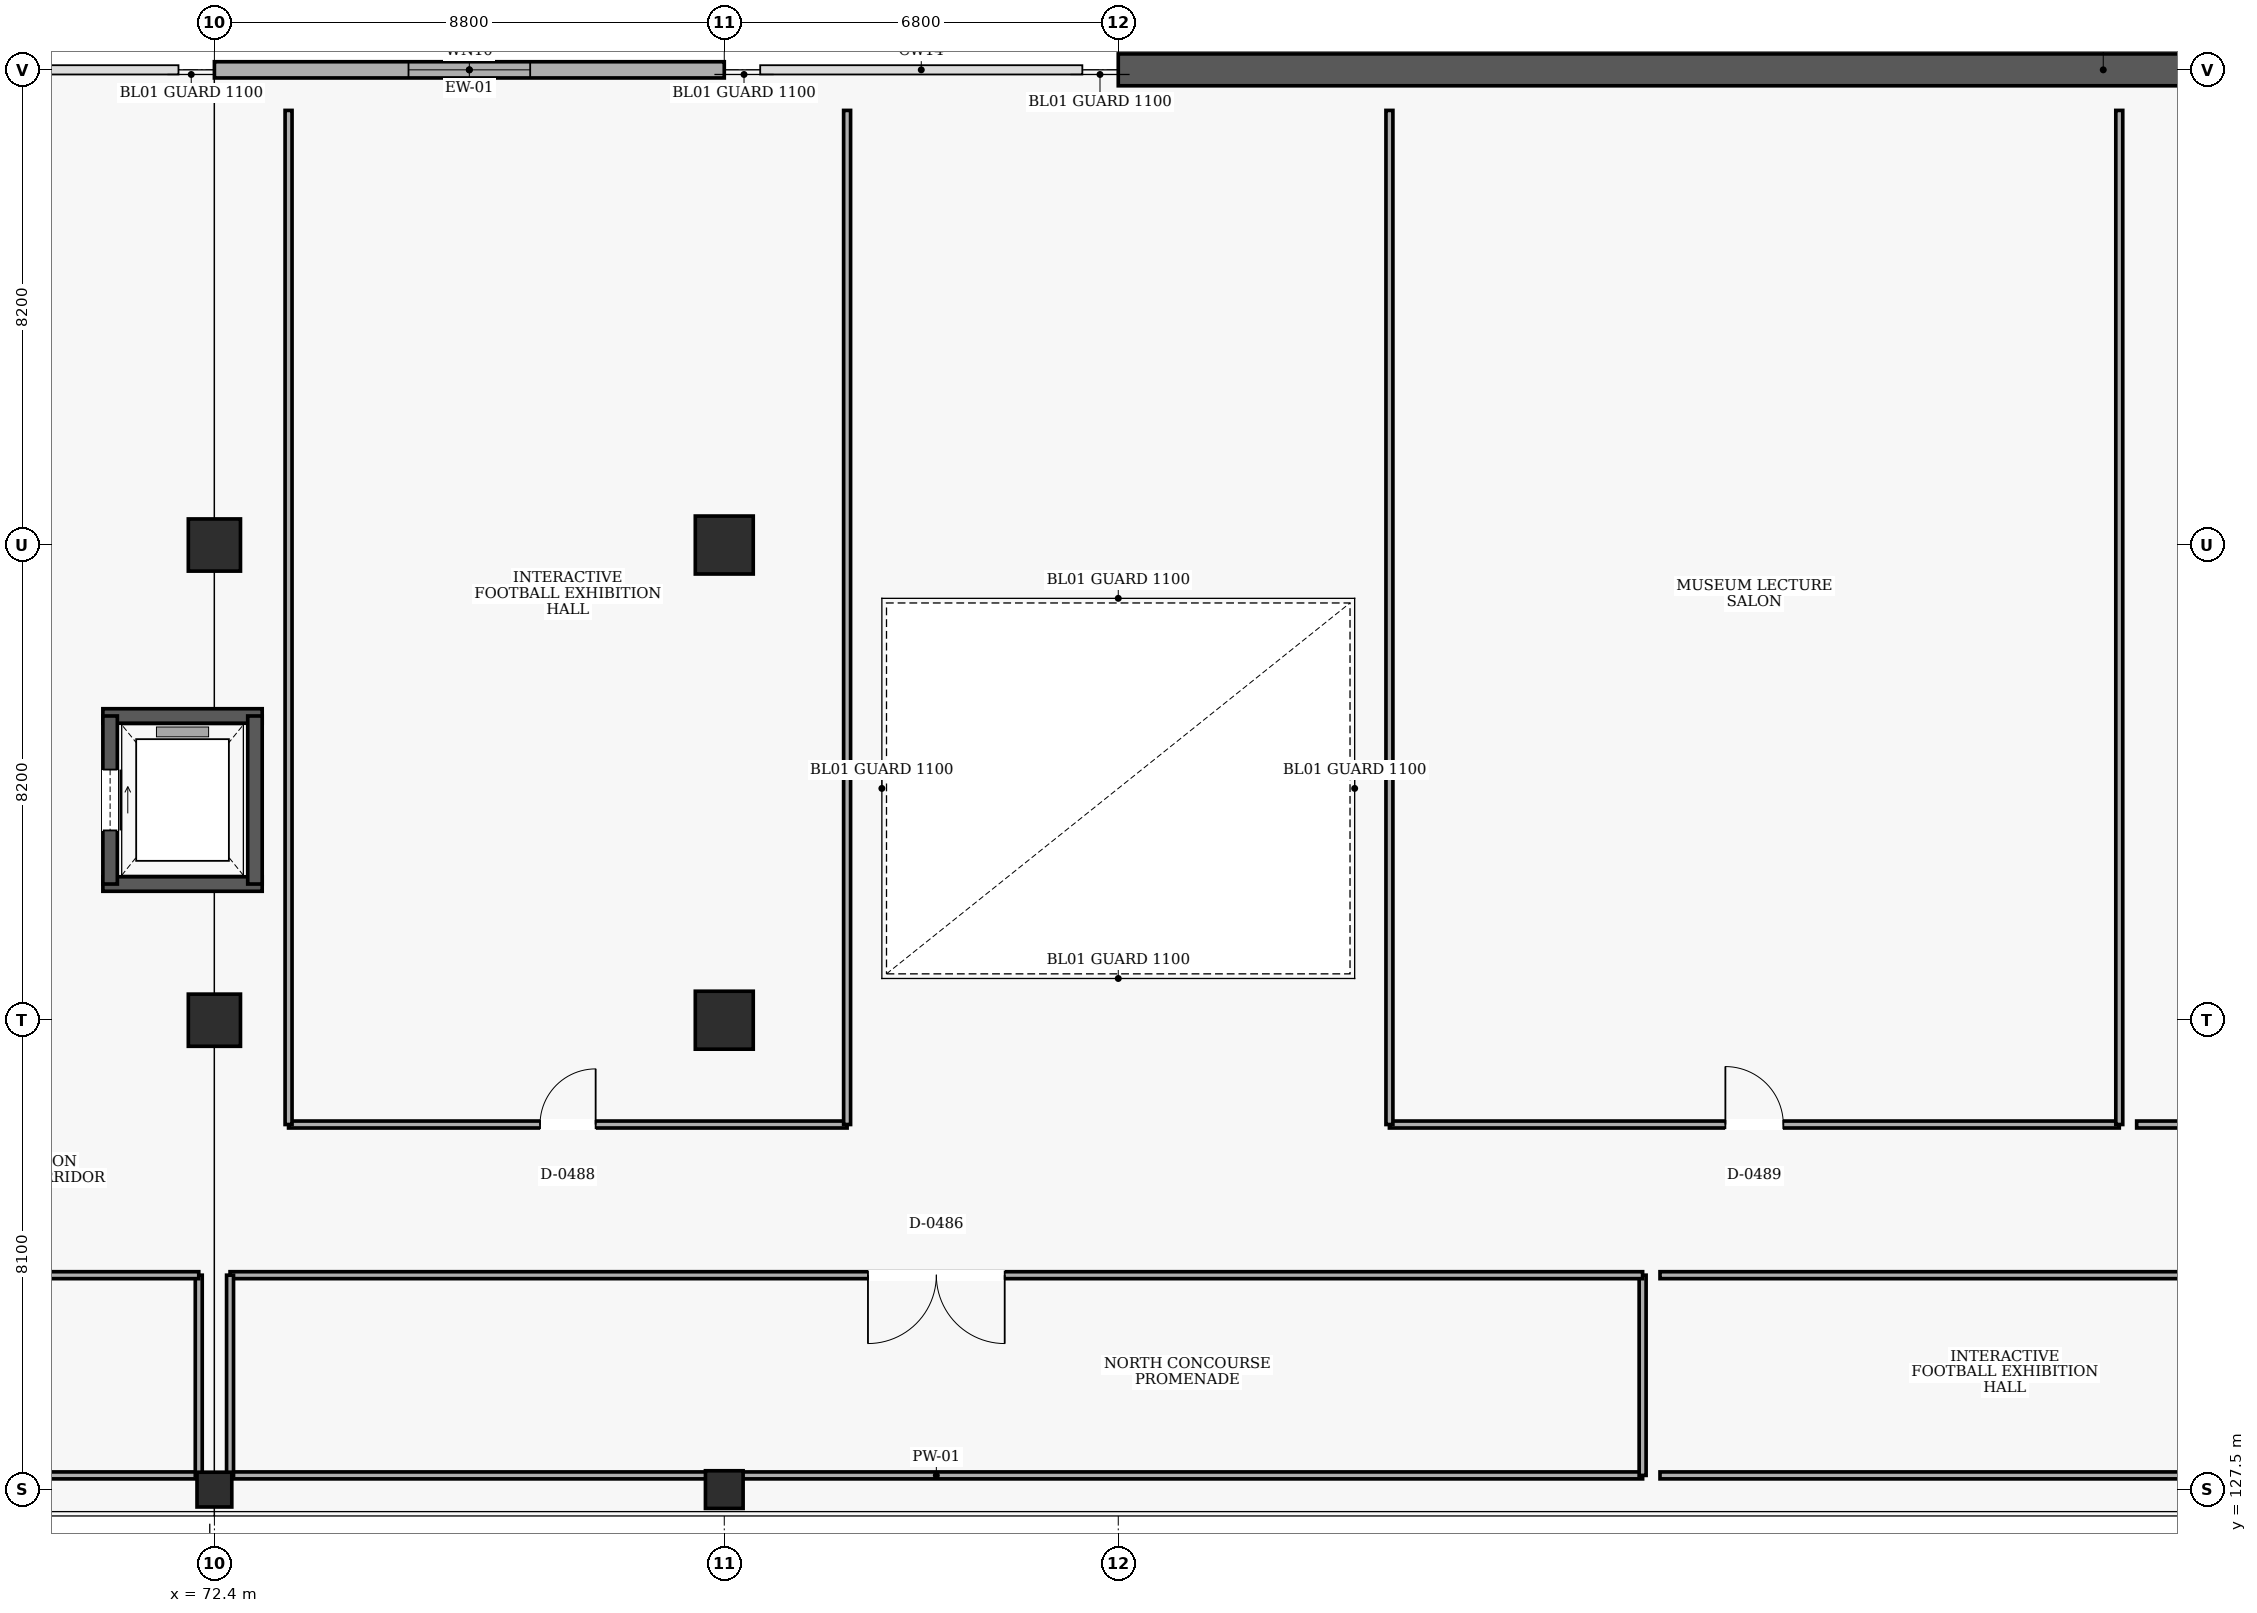
"""IFC4 building model, lengths in metres.
Left out: names, types, materials, properties, quantities, classifications, styles, units other than length and angle.
Written with IfcOpenShell. Run it as: python <this file> out.ifc"""

import sys

from ifc_helpers import new_model, si_unit, direction, frame, frame_2d, origin, origin_2d, place, context, subcontext, project, spatial, rectangle, extrude, element, fill, save


model = new_model("IFC4")
c1 = context("Model", 3, precision=1e-05, world=origin(), true_north=direction((0.0, 1.0)))
c2 = subcontext(c1, "Body", "Model", "MODEL_VIEW")
j1 = project(units=[si_unit("LENGTHUNIT", "METRE"), si_unit("PLANEANGLEUNIT", "RADIAN")], contexts=[c1])
p1 = place(None, origin())
s1 = spatial("IfcSite", under=j1, at=p1, CompositionType="ELEMENT")
p2 = place(p1, origin())
s2 = spatial("IfcBuilding", under=s1, at=p2, CompositionType="ELEMENT")
p3 = place(p2, frame((0.0, 0.0, 5.4)))
s3 = spatial("IfcBuildingStorey", under=s2, at=p3, CompositionType="ELEMENT", Elevation=5.4)
p4 = place(p3, frame((72.4, 127.5, 0.0), z_axis=(0.0, 0.0, 1.0), x_axis=(1.0, 0.0, 0.0)))
e1 = element("IfcColumn", 1, at=p4, inside=s3, PredefinedType="COLUMN", context=c2, shape_type="SweptSolid", body=[
    extrude(rectangle(XDim=0.6, YDim=0.6, at=origin_2d()), origin(), (0.0, 0.0, 1.0), 4.8),
])
for number, where, z_axis, x_axis in (
    (2, (72.4, 135.6, 0.0), (0.0, 0.0, 1.0), (1.0, 0.0, 0.0)),
    (3, (72.4, 143.8, 0.0), (0.0, 0.0, 1.0), (1.0, 0.0, 0.0)),
):
    element("IfcColumn", number, at=place(p3, frame(where, z_axis=z_axis, x_axis=x_axis)), inside=s3, PredefinedType="COLUMN", context=c2, shape_type="SweptSolid", body=[
        extrude(rectangle(XDim=0.9, YDim=0.9, at=origin_2d()), origin(), (0.0, 0.0, 1.0), 4.8),
    ])
p5 = place(p3, frame((81.2, 127.5, 0.0), z_axis=(0.0, 0.0, 1.0), x_axis=(1.0, 0.0, 0.0)))
e4 = element("IfcColumn", 4, at=p5, inside=s3, PredefinedType="COLUMN", context=c2, shape_type="SweptSolid", body=[
    extrude(rectangle(XDim=0.65, YDim=0.65, at=origin_2d()), origin(), (0.0, 0.0, 1.0), 4.8),
])
for number, where, z_axis, x_axis in (
    (5, (81.2, 135.6, 0.0), (0.0, 0.0, 1.0), (1.0, 0.0, 0.0)),
    (6, (81.2, 143.8, 0.0), (0.0, 0.0, 1.0), (1.0, 0.0, 0.0)),
):
    element("IfcColumn", number, at=place(p3, frame(where, z_axis=z_axis, x_axis=x_axis)), inside=s3, PredefinedType="COLUMN", context=c2, shape_type="SweptSolid", body=[
        extrude(rectangle(XDim=1.0, YDim=1.0, at=origin_2d()), origin(), (0.0, 0.0, 1.0), 4.8),
    ])
p6 = place(p3, frame((72.4, 152.0, 0.0), z_axis=(0.0, 0.0, 1.0), x_axis=(1.0, 0.0, 0.0)))
e7 = element("IfcWall", 7, at=p6, inside=s3, PredefinedType="SOLIDWALL", context=c2, shape_type="SweptSolid", body=[
    extrude(rectangle(XDim=8.8, YDim=0.28, at=frame_2d((4.4, 0.0))), origin(), (0.0, 0.0, 1.0), 4.48),
])
p7 = place(p6, frame((3.35, 0.0, 0.9)))
e8 = element("IfcOpeningElement", 8, at=p7, cuts=e7, PredefinedType="OPENING", context=c2, shape_type="SweptSolid", body=[
    extrude(rectangle(XDim=2.1, YDim=1.8, at=frame_2d((1.05, 0.9))), frame((0.0, 0.15, 0.0), z_axis=(0.0, -1.0, 0.0), x_axis=(1.0, 0.0, 0.0)), (0.0, 0.0, 1.0), 0.3),
])
p8 = place(p3, frame((88.0, 152.0, 0.0), z_axis=(0.0, 0.0, 1.0), x_axis=(1.0, 0.0, 0.0)))
e9 = element("IfcWall", 9, at=p8, inside=s3, PredefinedType="SHEAR", context=c2, shape_type="SweptSolid", body=[
    extrude(rectangle(XDim=34.0, YDim=0.55, at=frame_2d((17.0, 0.0))), origin(), (0.0, 0.0, 1.0), 4.48),
])
for number, where, z_axis, x_axis in (
    (10, (70.475, 137.95, 0.0), (0.0, 0.0, 1.0), (1.0, 0.0, 0.0)),
    (11, (73.225, 140.85, 0.0), (0.0, 0.0, 1.0), (-1.0, 0.0, 0.0)),
):
    element("IfcWall", number, at=place(p3, frame(where, z_axis=z_axis, x_axis=x_axis)), inside=s3, PredefinedType="SHEAR", context=c2, shape_type="SweptSolid", body=[
        extrude(rectangle(XDim=2.75, YDim=0.25, at=frame_2d((1.375, 0.0))), origin(), (0.0, 0.0, 1.0), 4.5),
    ])
p9 = place(p3, frame((70.6, 140.85, 0.0), z_axis=(0.0, 0.0, 1.0), x_axis=(0.0, -1.0, 0.0)))
e12 = element("IfcWall", 12, at=p9, inside=s3, PredefinedType="SHEAR", context=c2, shape_type="SweptSolid", body=[
    extrude(rectangle(XDim=2.9, YDim=0.25, at=frame_2d((1.45, 0.0))), origin(), (0.0, 0.0, 1.0), 4.5),
])
p10 = place(p9, frame((0.925, 0.0, 0.0)))
e13 = element("IfcOpeningElement", 13, at=p10, cuts=e12, PredefinedType="OPENING", context=c2, shape_type="SweptSolid", body=[
    extrude(rectangle(XDim=1.05, YDim=2.15, at=frame_2d((0.525, 1.075))), frame((0.0, 0.135, 0.0), z_axis=(0.0, -1.0, 0.0), x_axis=(1.0, 0.0, 0.0)), (0.0, 0.0, 1.0), 0.27),
])
p11 = place(p3, frame((73.1, 137.95, 0.0), z_axis=(0.0, 0.0, 1.0), x_axis=(0.0, 1.0, 0.0)))
e14 = element("IfcWall", 14, at=p11, inside=s3, PredefinedType="SHEAR", context=c2, shape_type="SweptSolid", body=[
    extrude(rectangle(XDim=2.9, YDim=0.25, at=frame_2d((1.45, 0.0))), origin(), (0.0, 0.0, 1.0), 4.5),
])
p12 = place(p3, frame((56.618, 127.745, 0.0), z_axis=(0.0, 0.0, 1.0), x_axis=(1.0, 0.0, 0.0)))
e15 = element("IfcWall", 15, at=p12, inside=s3, PredefinedType="PARTITIONING", context=c2, shape_type="SweptSolid", body=[
    extrude(rectangle(XDim=15.511, YDim=0.12, at=frame_2d((7.756, 0.0))), origin(), (0.0, 0.0, 1.0), 3.63),
])
p13 = place(p3, frame((72.13, 127.745, 0.0), z_axis=(0.0, 0.0, 1.0), x_axis=(0.0, 1.0, 0.0)))
e16 = element("IfcWall", 16, at=p13, inside=s3, PredefinedType="PARTITIONING", context=c2, shape_type="SweptSolid", body=[
    extrude(rectangle(XDim=3.455, YDim=0.12, at=frame_2d((1.728, 0.0))), origin(), (0.0, 0.0, 1.0), 3.78),
])
p14 = place(p3, frame((72.13, 131.2, 0.0), z_axis=(0.0, 0.0, 1.0), x_axis=(-1.0, 0.0, 0.0)))
e17 = element("IfcWall", 17, at=p14, inside=s3, PredefinedType="PARTITIONING", context=c2, shape_type="SweptSolid", body=[
    extrude(rectangle(XDim=15.511, YDim=0.12, at=frame_2d((7.756, 0.0))), origin(), (0.0, 0.0, 1.0), 4.5),
])
p15 = place(p14, frame((6.716, 0.0, 0.0)))
e18 = element("IfcOpeningElement", 18, at=p15, cuts=e17, PredefinedType="OPENING", context=c2, shape_type="SweptSolid", body=[
    extrude(rectangle(XDim=2.08, YDim=2.35, at=frame_2d((1.04, 1.175))), frame((0.0, 0.07, 0.0), z_axis=(0.0, -1.0, 0.0), x_axis=(1.0, 0.0, 0.0)), (0.0, 0.0, 1.0), 0.14),
])
p16 = place(p3, frame((72.67, 127.745, 0.0), z_axis=(0.0, 0.0, 1.0), x_axis=(1.0, 0.0, 0.0)))
e19 = element("IfcWall", 19, at=p16, inside=s3, PredefinedType="PARTITIONING", context=c2, shape_type="SweptSolid", body=[
    extrude(rectangle(XDim=24.38, YDim=0.12, at=frame_2d((12.19, 0.0))), origin(), (0.0, 0.0, 1.0), 3.68),
])
p17 = place(p3, frame((97.05, 127.745, 0.0), z_axis=(0.0, 0.0, 1.0), x_axis=(0.0, 1.0, 0.0)))
e20 = element("IfcWall", 20, at=p17, inside=s3, PredefinedType="PARTITIONING", context=c2, shape_type="SweptSolid", body=[
    extrude(rectangle(XDim=3.455, YDim=0.12, at=frame_2d((1.728, 0.0))), origin(), (0.0, 0.0, 1.0), 4.5),
])
p18 = place(p3, frame((97.05, 131.2, 0.0), z_axis=(0.0, 0.0, 1.0), x_axis=(-1.0, 0.0, 0.0)))
e21 = element("IfcWall", 21, at=p18, inside=s3, PredefinedType="PARTITIONING", context=c2, shape_type="SweptSolid", body=[
    extrude(rectangle(XDim=24.38, YDim=0.12, at=frame_2d((12.19, 0.0))), origin(), (0.0, 0.0, 1.0), 4.5),
])
p19 = place(p18, frame((11.01, 0.0, 0.0)))
e22 = element("IfcOpeningElement", 22, at=p19, cuts=e21, PredefinedType="OPENING", context=c2, shape_type="SweptSolid", body=[
    extrude(rectangle(XDim=2.36, YDim=2.4, at=frame_2d((1.18, 1.2))), frame((0.0, 0.07, 0.0), z_axis=(0.0, -1.0, 0.0), x_axis=(1.0, 0.0, 0.0)), (0.0, 0.0, 1.0), 0.14),
])
p20 = place(p3, frame((72.67, 131.2, 0.0), z_axis=(0.0, 0.0, 1.0), x_axis=(0.0, -1.0, 0.0)))
e23 = element("IfcWall", 23, at=p20, inside=s3, PredefinedType="PARTITIONING", context=c2, shape_type="SweptSolid", body=[
    extrude(rectangle(XDim=3.455, YDim=0.12, at=frame_2d((1.728, 0.0))), origin(), (0.0, 0.0, 1.0), 3.78),
])
p21 = place(p3, frame((97.35, 127.745, 0.0), z_axis=(0.0, 0.0, 1.0), x_axis=(1.0, 0.0, 0.0)))
e24 = element("IfcWall", 24, at=p21, inside=s3, PredefinedType="PARTITIONING", context=c2, shape_type="SweptSolid", body=[
    extrude(rectangle(XDim=24.38, YDim=0.12, at=frame_2d((12.19, 0.0))), origin(), (0.0, 0.0, 1.0), 4.5),
])
p22 = place(p3, frame((121.73, 131.2, 0.0), z_axis=(0.0, 0.0, 1.0), x_axis=(-1.0, 0.0, 0.0)))
e25 = element("IfcWall", 25, at=p22, inside=s3, PredefinedType="PARTITIONING", context=c2, shape_type="SweptSolid", body=[
    extrude(rectangle(XDim=24.38, YDim=0.12, at=frame_2d((12.19, 0.0))), origin(), (0.0, 0.0, 1.0), 4.5),
])
p23 = place(p22, frame((11.73, 0.0, 0.0)))
e26 = element("IfcOpeningElement", 26, at=p23, cuts=e25, PredefinedType="OPENING", context=c2, shape_type="SweptSolid", body=[
    extrude(rectangle(XDim=0.92, YDim=2.1, at=frame_2d((0.46, 1.05))), frame((0.0, 0.07, 0.0), z_axis=(0.0, -1.0, 0.0), x_axis=(1.0, 0.0, 0.0)), (0.0, 0.0, 1.0), 0.14),
])
p24 = place(p3, frame((73.68, 133.8, 0.0), z_axis=(0.0, 0.0, 1.0), x_axis=(1.0, 0.0, 0.0)))
e27 = element("IfcWall", 27, at=p24, inside=s3, PredefinedType="PARTITIONING", context=c2, shape_type="SweptSolid", body=[
    extrude(rectangle(XDim=9.64, YDim=0.12, at=frame_2d((4.82, 0.0))), origin(), (0.0, 0.0, 1.0), 4.5),
])
p25 = place(p24, frame((4.34, 0.0, 0.0)))
e28 = element("IfcOpeningElement", 28, at=p25, cuts=e27, PredefinedType="OPENING", context=c2, shape_type="SweptSolid", body=[
    extrude(rectangle(XDim=0.96, YDim=2.1, at=frame_2d((0.48, 1.05))), frame((0.0, 0.07, 0.0), z_axis=(0.0, -1.0, 0.0), x_axis=(1.0, 0.0, 0.0)), (0.0, 0.0, 1.0), 0.14),
])
for number, where, z_axis, x_axis in (
    (29, (83.32, 133.8, 0.0), (0.0, 0.0, 1.0), (0.0, 1.0, 0.0)),
    (30, (73.68, 151.3, 0.0), (0.0, 0.0, 1.0), (0.0, -1.0, 0.0)),
):
    element("IfcWall", number, at=place(p3, frame(where, z_axis=z_axis, x_axis=x_axis)), inside=s3, PredefinedType="PARTITIONING", context=c2, shape_type="SweptSolid", body=[
        extrude(rectangle(XDim=17.5, YDim=0.12, at=frame_2d((8.75, 0.0))), origin(), (0.0, 0.0, 1.0), 4.5),
    ])
p26 = place(p3, frame((92.68, 133.8, 0.0), z_axis=(0.0, 0.0, 1.0), x_axis=(1.0, 0.0, 0.0)))
e31 = element("IfcWall", 31, at=p26, inside=s3, PredefinedType="PARTITIONING", context=c2, shape_type="SweptSolid", body=[
    extrude(rectangle(XDim=12.597, YDim=0.12, at=frame_2d((6.298, 0.0))), origin(), (0.0, 0.0, 1.0), 4.5),
])
p27 = place(p26, frame((5.798, 0.0, 0.0)))
e32 = element("IfcOpeningElement", 32, at=p27, cuts=e31, PredefinedType="OPENING", context=c2, shape_type="SweptSolid", body=[
    extrude(rectangle(XDim=1.0, YDim=2.1, at=frame_2d((0.5, 1.05))), frame((0.0, 0.07, 0.0), z_axis=(0.0, -1.0, 0.0), x_axis=(1.0, 0.0, 0.0)), (0.0, 0.0, 1.0), 0.14),
])
for number, where, z_axis, x_axis in (
    (33, (105.277, 133.8, 0.0), (0.0, 0.0, 1.0), (0.0, 1.0, 0.0)),
    (34, (92.68, 151.3, 0.0), (0.0, 0.0, 1.0), (0.0, -1.0, 0.0)),
):
    element("IfcWall", number, at=place(p3, frame(where, z_axis=z_axis, x_axis=x_axis)), inside=s3, PredefinedType="PARTITIONING", context=c2, shape_type="SweptSolid", body=[
        extrude(rectangle(XDim=17.5, YDim=0.12, at=frame_2d((8.75, 0.0))), origin(), (0.0, 0.0, 1.0), 4.5),
    ])
p28 = place(p3, frame((105.577, 133.8, 0.0), z_axis=(0.0, 0.0, 1.0), x_axis=(1.0, 0.0, 0.0)))
e35 = element("IfcWall", 35, at=p28, inside=s3, PredefinedType="PARTITIONING", context=c2, shape_type="SweptSolid", body=[
    extrude(rectangle(XDim=16.153, YDim=0.12, at=frame_2d((8.077, 0.0))), origin(), (0.0, 0.0, 1.0), 4.5),
])
p29 = place(p28, frame((7.552, 0.0, 0.0)))
e36 = element("IfcOpeningElement", 36, at=p29, cuts=e35, PredefinedType="OPENING", context=c2, shape_type="SweptSolid", body=[
    extrude(rectangle(XDim=1.05, YDim=2.15, at=frame_2d((0.525, 1.075))), frame((0.0, 0.07, 0.0), z_axis=(0.0, -1.0, 0.0), x_axis=(1.0, 0.0, 0.0)), (0.0, 0.0, 1.0), 0.14),
])
p30 = place(p7, origin())
e37 = element("IfcWindow", 37, at=p30, inside=s3, PartitioningType="SINGLE_PANEL", PredefinedType="WINDOW", context=c2, shape_type="SweptSolid", body=[
    extrude(rectangle(XDim=2.1, YDim=1.8, at=frame_2d((1.05, 0.9))), frame((0.0, 0.03, 0.0), z_axis=(0.0, -1.0, 0.0), x_axis=(1.0, 0.0, 0.0)), (0.0, 0.0, 1.0), 0.06),
])
fill(e8, e37)
p31 = place(p10, origin())
e38 = element("IfcDoor", 38, at=p31, inside=s3, OperationType="SLIDING_TO_RIGHT", PredefinedType="DOOR", context=c2, shape_type="SweptSolid", body=[
    extrude(rectangle(XDim=1.05, YDim=2.15, at=frame_2d((0.525, 1.075))), frame((0.0, 0.025, 0.0), z_axis=(0.0, -1.0, 0.0), x_axis=(1.0, 0.0, 0.0)), (0.0, 0.0, 1.0), 0.05),
])
fill(e13, e38)
p32 = place(p19, origin())
e39 = element("IfcDoor", 39, at=p32, inside=s3, OperationType="DOUBLE_DOOR_SINGLE_SWING", PredefinedType="DOOR", context=c2, shape_type="SweptSolid", body=[
    extrude(rectangle(XDim=2.36, YDim=2.4, at=frame_2d((1.18, 1.2))), frame((0.0, 0.025, 0.0), z_axis=(0.0, -1.0, 0.0), x_axis=(1.0, 0.0, 0.0)), (0.0, 0.0, 1.0), 0.05),
])
fill(e22, e39)
p33 = place(p25, origin())
e40 = element("IfcDoor", 40, at=p33, inside=s3, OperationType="SINGLE_SWING_RIGHT", PredefinedType="DOOR", context=c2, shape_type="SweptSolid", body=[
    extrude(rectangle(XDim=0.96, YDim=2.1, at=frame_2d((0.48, 1.05))), frame((0.0, 0.025, 0.0), z_axis=(0.0, -1.0, 0.0), x_axis=(1.0, 0.0, 0.0)), (0.0, 0.0, 1.0), 0.05),
])
fill(e28, e40)
p34 = place(p27, origin())
e41 = element("IfcDoor", 41, at=p34, inside=s3, OperationType="SINGLE_SWING_LEFT", PredefinedType="DOOR", context=c2, shape_type="SweptSolid", body=[
    extrude(rectangle(XDim=1.0, YDim=2.1, at=frame_2d((0.5, 1.05))), frame((0.0, 0.025, 0.0), z_axis=(0.0, -1.0, 0.0), x_axis=(1.0, 0.0, 0.0)), (0.0, 0.0, 1.0), 0.05),
])
fill(e32, e41)
save(model, sys.argv[1])
